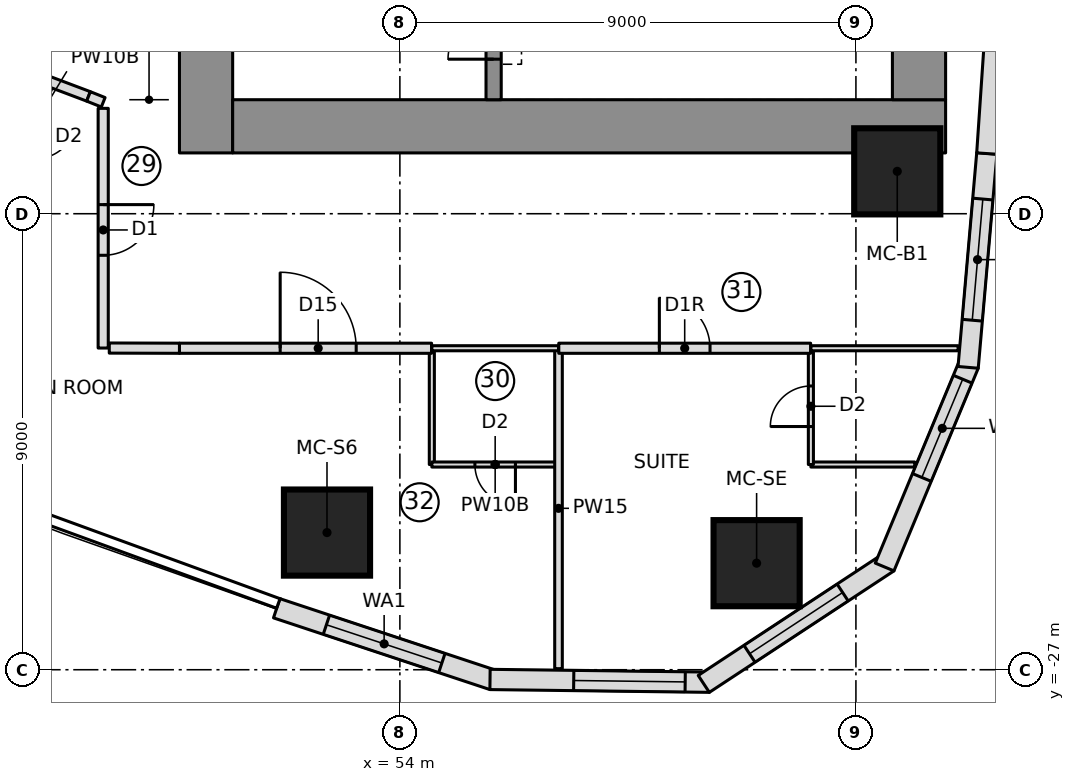
"""IFC4 building model, lengths in metres.
Left out: names, types, materials, properties, quantities, classifications, styles, units other than length and angle.
Written with IfcOpenShell. Run it as: python <this file> out.ifc"""

import sys

from ifc_helpers import new_model, si_unit, direction, frame, frame_2d, origin, origin_2d, place, context, subcontext, project, spatial, polyline, rectangle, outline, extrude, element, fill, save


model = new_model("IFC4")
c1 = context("Model", 3, precision=1e-05, world=origin(), true_north=direction((0.0, 1.0)))
c2 = subcontext(c1, "Body", "Model", "MODEL_VIEW")
j1 = project(units=[si_unit("LENGTHUNIT", "METRE"), si_unit("PLANEANGLEUNIT", "RADIAN")], contexts=[c1])
p1 = place(None, origin())
s1 = spatial("IfcSite", under=j1, at=p1, CompositionType="ELEMENT")
p2 = place(p1, origin())
s2 = spatial("IfcBuilding", under=s1, at=p2, CompositionType="ELEMENT")
p3 = place(p2, frame((0.0, 0.0, 106.2)))
s3 = spatial("IfcBuildingStorey", under=s2, at=p3, CompositionType="ELEMENT", Elevation=106.2)
p4 = place(p3, frame((50.175, -16.8, 0.0), z_axis=(0.0, 0.0, 1.0), x_axis=(0.0, 1.0, 0.0)))
e1 = element("IfcWall", 1, at=p4, inside=s3, PredefinedType="SHEAR", context=c2, shape_type="SweptSolid", body=[
    extrude(rectangle(XDim=10.15, YDim=1.05, at=frame_2d((5.075, 0.0))), origin(), (0.0, 0.0, 1.0), 3.55),
])
p5 = place(p4, frame((2.55, 0.0, 0.0)))
e2 = element("IfcOpeningElement", 2, at=p5, cuts=e1, PredefinedType="OPENING", context=c2, shape_type="SweptSolid", body=[
    extrude(rectangle(XDim=1.1, YDim=2.1, at=frame_2d((0.55, 1.05))), frame((0.0, 0.535, 0.0), z_axis=(0.0, -1.0, 0.0), x_axis=(1.0, 0.0, 0.0)), (0.0, 0.0, 1.0), 1.07),
])
p6 = place(p3, frame((50.7, -16.275, 0.0), z_axis=(0.0, 0.0, 1.0), x_axis=(1.0, 0.0, 0.0)))
e3 = element("IfcWall", 3, at=p6, inside=s3, PredefinedType="SHEAR", context=c2, shape_type="SweptSolid", body=[
    extrude(rectangle(XDim=14.07, YDim=1.05, at=frame_2d((7.035, 0.0))), origin(), (0.0, 0.0, 1.0), 3.55),
])
p7 = place(p3, frame((64.245, -15.75, 0.0), z_axis=(0.0, 0.0, 1.0), x_axis=(0.0, 1.0, 0.0)))
e4 = element("IfcWall", 4, at=p7, inside=s3, PredefinedType="SHEAR", context=c2, shape_type="SweptSolid", body=[
    extrude(rectangle(XDim=6.361, YDim=1.05, at=frame_2d((3.181, 0.0))), origin(), (0.0, 0.0, 1.0), 3.55),
])
p8 = place(p3, frame((55.85, -15.75, 0.0), z_axis=(0.0, 0.0, 1.0), x_axis=(0.0, 1.0, 0.0)))
e5 = element("IfcWall", 5, at=p8, inside=s3, PredefinedType="SHEAR", context=c2, shape_type="SweptSolid", body=[
    extrude(rectangle(XDim=5.4, YDim=0.3, at=frame_2d((2.7, 0.0))), origin(), (0.0, 0.0, 1.0), 3.55),
])
p9 = place(p8, frame((3.6, 0.0, 0.0)))
e6 = element("IfcOpeningElement", 6, at=p9, cuts=e5, PredefinedType="OPENING", context=c2, shape_type="SweptSolid", body=[
    extrude(rectangle(XDim=1.1, YDim=2.1, at=frame_2d((0.55, 1.05))), frame((0.0, 0.16, 0.0), z_axis=(0.0, -1.0, 0.0), x_axis=(1.0, 0.0, 0.0)), (0.0, 0.0, 1.0), 0.32),
])
p10 = place(p8, frame((0.8, 0.0, 0.0)))
e7 = element("IfcOpeningElement", 7, at=p10, cuts=e5, PredefinedType="OPENING", context=c2, shape_type="SweptSolid", body=[
    extrude(rectangle(XDim=0.9, YDim=2.1, at=frame_2d((0.45, 1.05))), frame((0.0, 0.16, 0.0), z_axis=(0.0, -1.0, 0.0), x_axis=(1.0, 0.0, 0.0)), (0.0, 0.0, 1.0), 0.32),
])
for number, where, z_axis, x_axis in (
    (8, (52.562, -24.293, 0.0), (0.0, 0.0, 1.0), (1.0, 0.0, 0.0)),
    (9, (61.04, -24.897, 0.0), (0.0, 0.0, 1.0), (1.0, 0.0, 0.0)),
    (10, (63.816, -17.164, 0.0), (0.0, 0.0, 1.0), (1.0, 0.0, 0.0)),
):
    element("IfcColumn", number, at=place(p3, frame(where, z_axis=z_axis, x_axis=x_axis)), inside=s3, PredefinedType="COLUMN", context=c2, shape_type="SweptSolid", body=[
        extrude(rectangle(XDim=1.7, YDim=1.7, at=origin_2d()), origin(), (0.0, 0.0, 1.0), 3.55),
    ])
p11 = place(p3, frame((51.569, -25.787, 0.0), z_axis=(0.0, 0.0, 1.0), x_axis=(0.94925004851, -0.314522408429, 0.0)))
e11 = element("IfcWall", 11, at=p11, inside=s3, PredefinedType="NOTDEFINED", context=c2, shape_type="SweptSolid", body=[
    extrude(outline(polyline([(0.0, -0.2), (4.499, -0.2), (4.437, 0.2), (0.0, 0.2), (0.0, -0.2)])), origin(), (0.0, 0.0, 1.0), 3.25),
])
p12 = place(p11, frame((1.034, 0.0, 0.5)))
e12 = element("IfcOpeningElement", 12, at=p12, cuts=e11, PredefinedType="OPENING", context=c2, shape_type="SweptSolid", body=[
    extrude(rectangle(XDim=2.4, YDim=2.0, at=frame_2d((1.2, 1.0))), frame((0.0, 0.21, 0.0), z_axis=(0.0, -1.0, 0.0), x_axis=(1.0, 0.0, 0.0)), (0.0, 0.0, 1.0), 0.42),
])
p13 = place(p3, frame((55.81, -27.192, 0.0), z_axis=(0.0, 0.0, 1.0), x_axis=(0.999919718849, -0.012671063772, 0.0)))
e13 = element("IfcWall", 13, at=p13, inside=s3, PredefinedType="NOTDEFINED", context=c2, shape_type="SweptSolid", body=[
    extrude(outline(polyline([(-0.031, -0.2), (4.3, -0.2), (4.177, 0.2), (0.031, 0.2), (-0.031, -0.2)])), origin(), (0.0, 0.0, 1.0), 3.25),
])
p14 = place(p13, frame((1.621, 0.0, 0.6)))
e14 = element("IfcOpeningElement", 14, at=p14, cuts=e13, PredefinedType="OPENING", context=c2, shape_type="SweptSolid", body=[
    extrude(outline(polyline([(0.0, 1.35), (0.084, 1.771), (0.322, 2.128), (0.679, 2.366), (1.1, 2.45), (1.521, 2.366), (1.878, 2.128), (2.116, 1.771), (2.2, 1.35), (2.2, 1.1), (2.116, 0.679), (1.878, 0.322), (1.521, 0.084), (1.1, 0.0), (0.679, 0.084), (0.322, 0.322), (0.084, 0.679), (0.0, 1.1), (0.0, 1.35)])), frame((0.0, 0.21, 0.0), z_axis=(0.0, -1.0, 0.0), x_axis=(1.0, 0.0, 0.0)), (0.0, 0.0, 1.0), 0.42),
])
p15 = place(p3, frame((60.049, -27.246, 0.0), z_axis=(0.0, 0.0, 1.0), x_axis=(0.835340523653, 0.549732852887, 0.0)))
e15 = element("IfcWall", 15, at=p15, inside=s3, PredefinedType="NOTDEFINED", context=c2, shape_type="SweptSolid", body=[
    extrude(outline(polyline([(-0.061, -0.2), (4.3, -0.2), (4.178, 0.2), (0.061, 0.2), (-0.061, -0.2)])), origin(), (0.0, 0.0, 1.0), 3.25),
])
p16 = place(p15, frame((1.02, 0.0, 0.6)))
e16 = element("IfcOpeningElement", 16, at=p16, cuts=e15, PredefinedType="OPENING", context=c2, shape_type="SweptSolid", body=[
    extrude(outline(polyline([(0.0, 1.35), (0.084, 1.771), (0.322, 2.128), (0.679, 2.366), (1.1, 2.45), (1.521, 2.366), (1.878, 2.128), (2.116, 1.771), (2.2, 1.35), (2.2, 1.1), (2.116, 0.679), (1.878, 0.322), (1.521, 0.084), (1.1, 0.0), (0.679, 0.084), (0.322, 0.322), (0.084, 0.679), (0.0, 1.1), (0.0, 1.35)])), frame((0.0, 0.21, 0.0), z_axis=(0.0, -1.0, 0.0), x_axis=(1.0, 0.0, 0.0)), (0.0, 0.0, 1.0), 0.42),
])
p17 = place(p3, frame((63.59, -24.916, 0.0), z_axis=(0.0, 0.0, 1.0), x_axis=(0.383997751971, 0.923334027577, 0.0)))
e17 = element("IfcWall", 17, at=p17, inside=s3, PredefinedType="NOTDEFINED", context=c2, shape_type="SweptSolid", body=[
    extrude(outline(polyline([(-0.061, -0.2), (4.27, -0.2), (4.208, 0.2), (0.061, 0.2), (-0.061, -0.2)])), origin(), (0.0, 0.0, 1.0), 3.25),
])
p18 = place(p17, frame((1.852, 0.0, 0.6)))
e18 = element("IfcOpeningElement", 18, at=p18, cuts=e17, PredefinedType="OPENING", context=c2, shape_type="SweptSolid", body=[
    extrude(outline(polyline([(0.0, 1.4), (0.08, 1.802), (0.308, 2.142), (0.648, 2.37), (1.05, 2.45), (1.452, 2.37), (1.792, 2.142), (2.02, 1.802), (2.1, 1.4), (2.1, 1.05), (2.02, 0.648), (1.792, 0.308), (1.452, 0.08), (1.05, 0.0), (0.648, 0.08), (0.308, 0.308), (0.08, 0.648), (0.0, 1.05), (0.0, 1.4)])), frame((0.0, 0.21, 0.0), z_axis=(0.0, -1.0, 0.0), x_axis=(1.0, 0.0, 0.0)), (0.0, 0.0, 1.0), 0.42),
])
p19 = place(p3, frame((65.217, -21.002, 0.0), z_axis=(0.0, 0.0, 1.0), x_axis=(0.086992730434, 0.996208946382, 0.0)))
e19 = element("IfcWall", 19, at=p19, inside=s3, PredefinedType="NOTDEFINED", context=c2, shape_type="SweptSolid", body=[
    extrude(outline(polyline([(-0.031, -0.2), (4.209, -0.2), (4.205, 0.2), (0.031, 0.2), (-0.031, -0.2)])), origin(), (0.0, 0.0, 1.0), 3.25),
])
p20 = place(p19, frame((0.903, 0.0, 0.5)))
e20 = element("IfcOpeningElement", 20, at=p20, cuts=e19, PredefinedType="OPENING", context=c2, shape_type="SweptSolid", body=[
    extrude(rectangle(XDim=2.4, YDim=2.0, at=frame_2d((1.2, 1.0))), frame((0.0, 0.21, 0.0), z_axis=(0.0, -1.0, 0.0), x_axis=(1.0, 0.0, 0.0)), (0.0, 0.0, 1.0), 0.42),
])
p21 = place(p3, frame((65.583, -16.811, 0.0), z_axis=(0.0, 0.0, 1.0), x_axis=(0.067724559895, 0.997704056315, 0.0)))
e21 = element("IfcWall", 21, at=p21, inside=s3, PredefinedType="NOTDEFINED", context=c2, shape_type="SweptSolid", body=[
    extrude(outline(polyline([(-0.002, -0.2), (4.209, -0.2), (4.205, 0.2), (0.002, 0.2), (-0.002, -0.2)])), origin(), (0.0, 0.0, 1.0), 3.25),
])
p22 = place(p3, frame((54.631, -22.95, 0.0), z_axis=(0.0, 0.0, 1.0), x_axis=(0.0, 1.0, 0.0)))
e22 = element("IfcWall", 22, at=p22, inside=s3, PredefinedType="PARTITIONING", context=c2, shape_type="SweptSolid", body=[
    extrude(rectangle(XDim=2.3, YDim=0.1, at=frame_2d((1.15, 0.0))), origin(), (0.0, 0.0, 1.0), 3.25),
])
p23 = place(p3, frame((57.131, -22.95, 0.0), z_axis=(0.0, 0.0, 1.0), x_axis=(-1.0, 0.0, 0.0)))
e23 = element("IfcWall", 23, at=p23, inside=s3, PredefinedType="PARTITIONING", context=c2, shape_type="SweptSolid", body=[
    extrude(rectangle(XDim=2.5, YDim=0.1, at=frame_2d((1.25, 0.0))), origin(), (0.0, 0.0, 1.0), 3.25),
])
p24 = place(p23, frame((0.85, 0.0, 0.0)))
e24 = element("IfcOpeningElement", 24, at=p24, cuts=e23, PredefinedType="OPENING", context=c2, shape_type="SweptSolid", body=[
    extrude(rectangle(XDim=0.8, YDim=2.1, at=frame_2d((0.4, 1.05))), frame((0.0, 0.06, 0.0), z_axis=(0.0, -1.0, 0.0), x_axis=(1.0, 0.0, 0.0)), (0.0, 0.0, 1.0), 0.12),
])
p25 = place(p3, frame((64.16, -22.95, 0.0), z_axis=(0.0, 0.0, 1.0), x_axis=(-1.0, 0.0, 0.0)))
e25 = element("IfcWall", 25, at=p25, inside=s3, PredefinedType="PARTITIONING", context=c2, shape_type="SweptSolid", body=[
    extrude(rectangle(XDim=2.049, YDim=0.1, at=frame_2d((1.025, 0.0))), origin(), (0.0, 0.0, 1.0), 3.25),
])
p26 = place(p3, frame((62.111, -22.95, 0.0), z_axis=(0.0, 0.0, 1.0), x_axis=(0.0, 1.0, 0.0)))
e26 = element("IfcWall", 26, at=p26, inside=s3, PredefinedType="PARTITIONING", context=c2, shape_type="SweptSolid", body=[
    extrude(rectangle(XDim=2.3, YDim=0.1, at=frame_2d((1.15, 0.0))), origin(), (0.0, 0.0, 1.0), 3.25),
])
p27 = place(p26, frame((0.75, 0.0, 0.0)))
e27 = element("IfcOpeningElement", 27, at=p27, cuts=e26, PredefinedType="OPENING", context=c2, shape_type="SweptSolid", body=[
    extrude(rectangle(XDim=0.8, YDim=2.1, at=frame_2d((0.4, 1.05))), frame((0.0, 0.06, 0.0), z_axis=(0.0, -1.0, 0.0), x_axis=(1.0, 0.0, 0.0)), (0.0, 0.0, 1.0), 0.12),
])
p28 = place(p3, frame((57.131, -26.979, 0.0), z_axis=(0.0, 0.0, 1.0), x_axis=(0.0, 1.0, 0.0)))
e28 = element("IfcWall", 28, at=p28, inside=s3, PredefinedType="PARTITIONING", context=c2, shape_type="SweptSolid", body=[
    extrude(rectangle(XDim=6.329, YDim=0.15, at=frame_2d((3.165, 0.0))), origin(), (0.0, 0.0, 1.0), 3.25),
])
p29 = place(p3, frame((47.122, -15.434, 0.0), z_axis=(0.0, 0.0, 1.0), x_axis=(-0.417409478396, -0.90871850831, 0.0)))
e29 = element("IfcWall", 29, at=p29, inside=s3, PredefinedType="PARTITIONING", context=c2, shape_type="SweptSolid", body=[
    extrude(rectangle(XDim=2.283, YDim=0.1, at=frame_2d((1.142, 0.0))), origin(), (0.0, 0.0, 1.0), 3.25),
])
p30 = place(p29, frame((0.75, 0.0, 0.0)))
e30 = element("IfcOpeningElement", 30, at=p30, cuts=e29, PredefinedType="OPENING", context=c2, shape_type="SweptSolid", body=[
    extrude(rectangle(XDim=0.8, YDim=2.1, at=frame_2d((0.4, 1.05))), frame((0.0, 0.06, 0.0), z_axis=(0.0, -1.0, 0.0), x_axis=(1.0, 0.0, 0.0)), (0.0, 0.0, 1.0), 0.12),
])
p31 = place(p3, frame((49.65, -20.655, 0.0), z_axis=(0.0, 0.0, 1.0), x_axis=(1.0, 0.0, 0.0)))
e31 = element("IfcWall", 31, at=p31, inside=s3, PredefinedType="PARTITIONING", context=c2, shape_type="SweptSolid", body=[
    extrude(rectangle(XDim=4.976, YDim=0.2, at=frame_2d((2.488, 0.0))), origin(), (0.0, 0.0, 1.0), 3.25),
])
p32 = place(p31, frame((1.988, 0.0, 0.0)))
e32 = element("IfcOpeningElement", 32, at=p32, cuts=e31, PredefinedType="OPENING", context=c2, shape_type="SweptSolid", body=[
    extrude(rectangle(XDim=1.5, YDim=2.1, at=frame_2d((0.75, 1.05))), frame((0.0, 0.11, 0.0), z_axis=(0.0, -1.0, 0.0), x_axis=(1.0, 0.0, 0.0)), (0.0, 0.0, 1.0), 0.22),
])
p33 = place(p3, frame((57.135, -20.655, 0.0), z_axis=(0.0, 0.0, 1.0), x_axis=(1.0, 0.0, 0.0)))
e33 = element("IfcWall", 33, at=p33, inside=s3, PredefinedType="PARTITIONING", context=c2, shape_type="SweptSolid", body=[
    extrude(rectangle(XDim=4.971, YDim=0.2, at=frame_2d((2.485, 0.0))), origin(), (0.0, 0.0, 1.0), 3.25),
])
p34 = place(p33, frame((1.985, 0.0, 0.0)))
e34 = element("IfcOpeningElement", 34, at=p34, cuts=e33, PredefinedType="OPENING", context=c2, shape_type="SweptSolid", body=[
    extrude(rectangle(XDim=1.0, YDim=2.1, at=frame_2d((0.5, 1.05))), frame((0.0, 0.11, 0.0), z_axis=(0.0, -1.0, 0.0), x_axis=(1.0, 0.0, 0.0)), (0.0, 0.0, 1.0), 0.22),
])
p35 = place(p3, frame((54.631, -20.655, 0.0), z_axis=(0.0, 0.0, 1.0), x_axis=(1.0, 0.0, 0.0)))
e35 = element("IfcWall", 35, at=p35, inside=s3, PredefinedType="PARTITIONING", context=c2, shape_type="SweptSolid", body=[
    extrude(rectangle(XDim=2.5, YDim=0.1, at=frame_2d((1.25, 0.0))), origin(), (0.0, 0.0, 1.0), 3.25),
])
p36 = place(p3, frame((62.111, -20.655, 0.0), z_axis=(0.0, 0.0, 1.0), x_axis=(1.0, 0.0, 0.0)))
e36 = element("IfcWall", 36, at=p36, inside=s3, PredefinedType="PARTITIONING", context=c2, shape_type="SweptSolid", body=[
    extrude(rectangle(XDim=2.906, YDim=0.1, at=frame_2d((1.453, 0.0))), origin(), (0.0, 0.0, 1.0), 3.25),
])
p37 = place(p3, frame((45.069, -14.634, 0.0), z_axis=(0.0, 0.0, 1.0), x_axis=(0.93564003724, -0.352955692282, 0.0)))
e37 = element("IfcWall", 37, at=p37, inside=s3, PredefinedType="PARTITIONING", context=c2, shape_type="SweptSolid", body=[
    extrude(rectangle(XDim=2.978, YDim=0.2, at=frame_2d((1.489, 0.0))), origin(), (0.0, 0.0, 1.0), 3.25),
])
p38 = place(p3, frame((47.855, -15.685, 0.0), z_axis=(0.0, 0.0, 1.0), x_axis=(0.928638194287, -0.370986662983, 0.0)))
e38 = element("IfcWall", 38, at=p38, inside=s3, PredefinedType="PARTITIONING", context=c2, shape_type="SweptSolid", body=[
    extrude(rectangle(XDim=0.312, YDim=0.2, at=frame_2d((0.156, 0.0))), origin(), (0.0, 0.0, 1.0), 3.25),
])
p39 = place(p3, frame((48.145, -15.92, 0.0), z_axis=(0.0, 0.0, 1.0), x_axis=(-5.1610239e-05, -0.999999998668, 0.0)))
e39 = element("IfcWall", 39, at=p39, inside=s3, PredefinedType="PARTITIONING", context=c2, shape_type="SweptSolid", body=[
    extrude(rectangle(XDim=4.73, YDim=0.2, at=frame_2d((2.365, 0.0))), origin(), (0.0, 0.0, 1.0), 3.25),
])
p40 = place(p39, frame((1.9, 0.0, 0.0)))
e40 = element("IfcOpeningElement", 40, at=p40, cuts=e39, PredefinedType="OPENING", context=c2, shape_type="SweptSolid", body=[
    extrude(rectangle(XDim=1.0, YDim=2.1, at=frame_2d((0.5, 1.05))), frame((0.0, 0.11, 0.0), z_axis=(0.0, -1.0, 0.0), x_axis=(1.0, 0.0, 0.0)), (0.0, 0.0, 1.0), 0.22),
])
p41 = place(p3, frame((48.265, -20.651, 0.0), z_axis=(0.0, 0.0, 1.0), x_axis=(0.999996503144, -0.002644560569, 0.0)))
e41 = element("IfcWall", 41, at=p41, inside=s3, PredefinedType="PARTITIONING", context=c2, shape_type="SweptSolid", body=[
    extrude(rectangle(XDim=1.385, YDim=0.2, at=frame_2d((0.692, 0.0))), origin(), (0.0, 0.0, 1.0), 3.25),
])
p42 = place(p12, origin())
e42 = element("IfcWindow", 42, at=p42, inside=s3, PartitioningType="SINGLE_PANEL", PredefinedType="WINDOW", context=c2, shape_type="SweptSolid", body=[
    extrude(rectangle(XDim=2.4, YDim=2.0, at=frame_2d((1.2, 1.0))), frame((0.0, 0.17, 0.0), z_axis=(0.0, -1.0, 0.0), x_axis=(1.0, 0.0, 0.0)), (0.0, 0.0, 1.0), 0.06),
])
fill(e12, e42)
p43 = place(p14, origin())
e43 = element("IfcWindow", 43, at=p43, inside=s3, PartitioningType="SINGLE_PANEL", PredefinedType="WINDOW", context=c2, shape_type="SweptSolid", body=[
    extrude(outline(polyline([(0.0, 1.35), (0.084, 1.771), (0.322, 2.128), (0.679, 2.366), (1.1, 2.45), (1.521, 2.366), (1.878, 2.128), (2.116, 1.771), (2.2, 1.35), (2.2, 1.1), (2.116, 0.679), (1.878, 0.322), (1.521, 0.084), (1.1, 0.0), (0.679, 0.084), (0.322, 0.322), (0.084, 0.679), (0.0, 1.1), (0.0, 1.35)])), frame((0.0, 0.17, 0.0), z_axis=(0.0, -1.0, 0.0), x_axis=(1.0, 0.0, 0.0)), (0.0, 0.0, 1.0), 0.06),
])
fill(e14, e43)
p44 = place(p16, origin())
e44 = element("IfcWindow", 44, at=p44, inside=s3, PartitioningType="SINGLE_PANEL", PredefinedType="WINDOW", context=c2, shape_type="SweptSolid", body=[
    extrude(outline(polyline([(0.0, 1.35), (0.084, 1.771), (0.322, 2.128), (0.679, 2.366), (1.1, 2.45), (1.521, 2.366), (1.878, 2.128), (2.116, 1.771), (2.2, 1.35), (2.2, 1.1), (2.116, 0.679), (1.878, 0.322), (1.521, 0.084), (1.1, 0.0), (0.679, 0.084), (0.322, 0.322), (0.084, 0.679), (0.0, 1.1), (0.0, 1.35)])), frame((0.0, 0.17, 0.0), z_axis=(0.0, -1.0, 0.0), x_axis=(1.0, 0.0, 0.0)), (0.0, 0.0, 1.0), 0.06),
])
fill(e16, e44)
p45 = place(p18, origin())
e45 = element("IfcWindow", 45, at=p45, inside=s3, PartitioningType="SINGLE_PANEL", PredefinedType="WINDOW", context=c2, shape_type="SweptSolid", body=[
    extrude(outline(polyline([(0.0, 1.4), (0.08, 1.802), (0.308, 2.142), (0.648, 2.37), (1.05, 2.45), (1.452, 2.37), (1.792, 2.142), (2.02, 1.802), (2.1, 1.4), (2.1, 1.05), (2.02, 0.648), (1.792, 0.308), (1.452, 0.08), (1.05, 0.0), (0.648, 0.08), (0.308, 0.308), (0.08, 0.648), (0.0, 1.05), (0.0, 1.4)])), frame((0.0, 0.17, 0.0), z_axis=(0.0, -1.0, 0.0), x_axis=(1.0, 0.0, 0.0)), (0.0, 0.0, 1.0), 0.06),
])
fill(e18, e45)
p46 = place(p20, origin())
e46 = element("IfcWindow", 46, at=p46, inside=s3, PartitioningType="SINGLE_PANEL", PredefinedType="WINDOW", context=c2, shape_type="SweptSolid", body=[
    extrude(rectangle(XDim=2.4, YDim=2.0, at=frame_2d((1.2, 1.0))), frame((0.0, 0.17, 0.0), z_axis=(0.0, -1.0, 0.0), x_axis=(1.0, 0.0, 0.0)), (0.0, 0.0, 1.0), 0.06),
])
fill(e20, e46)
p47 = place(p24, origin())
e47 = element("IfcDoor", 47, at=p47, inside=s3, OperationType="SINGLE_SWING_LEFT", PredefinedType="DOOR", context=c2, shape_type="SweptSolid", body=[
    extrude(rectangle(XDim=0.8, YDim=2.1, at=frame_2d((0.4, 1.05))), frame((0.0, 0.025, 0.0), z_axis=(0.0, -1.0, 0.0), x_axis=(1.0, 0.0, 0.0)), (0.0, 0.0, 1.0), 0.05),
])
fill(e24, e47)
p48 = place(p27, origin())
e48 = element("IfcDoor", 48, at=p48, inside=s3, OperationType="SINGLE_SWING_LEFT", PredefinedType="DOOR", context=c2, shape_type="SweptSolid", body=[
    extrude(rectangle(XDim=0.8, YDim=2.1, at=frame_2d((0.4, 1.05))), frame((0.0, 0.025, 0.0), z_axis=(0.0, -1.0, 0.0), x_axis=(1.0, 0.0, 0.0)), (0.0, 0.0, 1.0), 0.05),
])
fill(e27, e48)
p49 = place(p32, origin())
e49 = element("IfcDoor", 49, at=p49, inside=s3, OperationType="DOUBLE_DOOR_SINGLE_SWING", PredefinedType="DOOR", context=c2, shape_type="SweptSolid", body=[
    extrude(rectangle(XDim=1.5, YDim=2.1, at=frame_2d((0.75, 1.05))), frame((0.0, 0.025, 0.0), z_axis=(0.0, -1.0, 0.0), x_axis=(1.0, 0.0, 0.0)), (0.0, 0.0, 1.0), 0.05),
])
fill(e32, e49)
p50 = place(p34, origin())
e50 = element("IfcDoor", 50, at=p50, inside=s3, OperationType="SINGLE_SWING_RIGHT", PredefinedType="DOOR", context=c2, shape_type="SweptSolid", body=[
    extrude(rectangle(XDim=1.0, YDim=2.1, at=frame_2d((0.5, 1.05))), frame((0.0, 0.025, 0.0), z_axis=(0.0, -1.0, 0.0), x_axis=(1.0, 0.0, 0.0)), (0.0, 0.0, 1.0), 0.05),
])
fill(e34, e50)
p51 = place(p40, origin())
e51 = element("IfcDoor", 51, at=p51, inside=s3, OperationType="SINGLE_SWING_LEFT", PredefinedType="DOOR", context=c2, shape_type="SweptSolid", body=[
    extrude(rectangle(XDim=1.0, YDim=2.1, at=frame_2d((0.5, 1.05))), frame((0.0, 0.025, 0.0), z_axis=(0.0, -1.0, 0.0), x_axis=(1.0, 0.0, 0.0)), (0.0, 0.0, 1.0), 0.05),
])
fill(e40, e51)
p52 = place(p10, origin())
e52 = element("IfcDoor", 52, at=p52, inside=s3, OperationType="SINGLE_SWING_LEFT", PredefinedType="DOOR", context=c2, shape_type="SweptSolid", body=[
    extrude(rectangle(XDim=0.9, YDim=2.1, at=frame_2d((0.45, 1.05))), frame((0.0, 0.025, 0.0), z_axis=(0.0, -1.0, 0.0), x_axis=(1.0, 0.0, 0.0)), (0.0, 0.0, 1.0), 0.05),
])
fill(e7, e52)
save(model, sys.argv[1])
